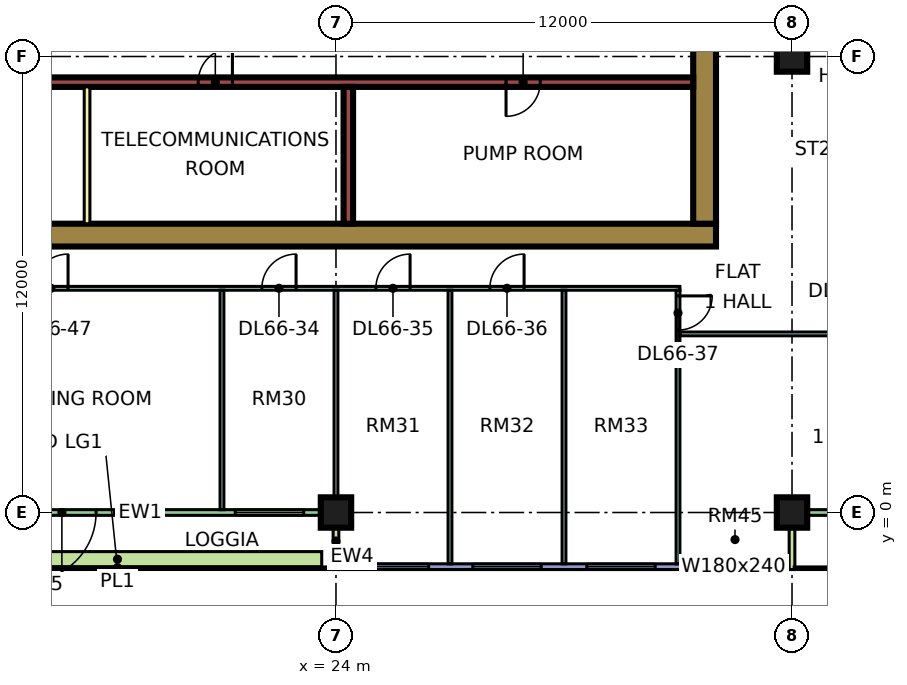
"""IFC4 building model, lengths in metres.
Left out: names, types, materials, properties, quantities, classifications, styles, units other than length and angle.
Written with IfcOpenShell. Run it as: python <this file> out.ifc"""

import sys

from ifc_helpers import new_model, si_unit, direction, frame, frame_2d, origin, origin_2d, place, context, subcontext, project, spatial, rectangle, extrude, element, fill, save


model = new_model("IFC4")
c1 = context("Model", 3, precision=1e-05, world=origin(), true_north=direction((0.0, 1.0)))
c2 = subcontext(c1, "Body", "Model", "MODEL_VIEW")
j1 = project(units=[si_unit("LENGTHUNIT", "METRE"), si_unit("PLANEANGLEUNIT", "RADIAN")], contexts=[c1])
p1 = place(None, origin())
s1 = spatial("IfcSite", under=j1, at=p1, CompositionType="ELEMENT")
p2 = place(p1, origin())
s2 = spatial("IfcBuilding", under=s1, at=p2, CompositionType="ELEMENT")
p3 = place(p2, frame((0.0, 0.0, 284.65)))
s3 = spatial("IfcBuildingStorey", under=s2, at=p3, CompositionType="ELEMENT", Elevation=284.65)
for number, where, z_axis, x_axis in (
    (1, (24.0, 0.0, 0.0), (0.0, 0.0, 1.0), (1.0, 0.0, 0.0)),
    (2, (36.0, 0.0, 0.0), (0.0, 0.0, 1.0), (1.0, 0.0, 0.0)),
    (3, (36.0, 12.0, 0.0), (0.0, 0.0, 1.0), (1.0, 0.0, 0.0)),
):
    element("IfcColumn", number, at=place(p3, frame(where, z_axis=z_axis, x_axis=x_axis)), inside=s3, PredefinedType="COLUMN", context=c2, shape_type="SweptSolid", body=[
        extrude(rectangle(XDim=0.8, YDim=0.8, at=origin_2d()), origin(), (0.0, 0.0, 1.0), 3.75),
    ])
p4 = place(p3, frame((9.0, 7.3, 0.0), z_axis=(0.0, 0.0, 1.0), x_axis=(1.0, 0.0, 0.0)))
e4 = element("IfcWall", 4, at=p4, inside=s3, PredefinedType="SHEAR", context=c2, shape_type="SweptSolid", body=[
    extrude(rectangle(XDim=25.0, YDim=0.6, at=frame_2d((12.5, 0.0))), origin(), (0.0, 0.0, 1.0), 3.75),
])
p5 = place(p3, frame((33.7, 7.6, 0.0), z_axis=(0.0, 0.0, 1.0), x_axis=(0.0, 1.0, 0.0)))
e5 = element("IfcWall", 5, at=p5, inside=s3, PredefinedType="SHEAR", context=c2, shape_type="SweptSolid", body=[
    extrude(rectangle(XDim=11.8, YDim=0.6, at=frame_2d((5.9, 0.0))), origin(), (0.0, 0.0, 1.0), 3.75),
])
p6 = place(p5, frame((5.6, 0.0, 0.0)))
e6 = element("IfcOpeningElement", 6, at=p6, cuts=e5, PredefinedType="OPENING", context=c2, shape_type="SweptSolid", body=[
    extrude(rectangle(XDim=1.8, YDim=2.4, at=frame_2d((0.9, 1.2))), frame((0.0, 0.31, 0.0), z_axis=(0.0, -1.0, 0.0), x_axis=(1.0, 0.0, 0.0)), (0.0, 0.0, 1.0), 0.62),
])
p7 = place(p3, frame((13.45, 11.325, 0.0), z_axis=(0.0, 0.0, 1.0), x_axis=(1.0, 0.0, 0.0)))
e7 = element("IfcWall", 7, at=p7, inside=s3, PredefinedType="SHEAR", context=c2, shape_type="SweptSolid", body=[
    extrude(rectangle(XDim=19.95, YDim=0.25, at=frame_2d((9.975, 0.0))), origin(), (0.0, 0.0, 1.0), 3.75),
])
p8 = place(p7, frame((1.55, 0.0, 0.0)))
e8 = element("IfcOpeningElement", 8, at=p8, cuts=e7, PredefinedType="OPENING", context=c2, shape_type="SweptSolid", body=[
    extrude(rectangle(XDim=0.9, YDim=2.1, at=frame_2d((0.45, 1.05))), frame((0.0, 0.135, 0.0), z_axis=(0.0, -1.0, 0.0), x_axis=(1.0, 0.0, 0.0)), (0.0, 0.0, 1.0), 0.27),
])
p9 = place(p7, frame((6.925, 0.0, 0.0)))
e9 = element("IfcOpeningElement", 9, at=p9, cuts=e7, PredefinedType="OPENING", context=c2, shape_type="SweptSolid", body=[
    extrude(rectangle(XDim=0.9, YDim=2.1, at=frame_2d((0.45, 1.05))), frame((0.0, 0.135, 0.0), z_axis=(0.0, -1.0, 0.0), x_axis=(1.0, 0.0, 0.0)), (0.0, 0.0, 1.0), 0.27),
])
p10 = place(p7, frame((15.025, 0.0, 0.0)))
e10 = element("IfcOpeningElement", 10, at=p10, cuts=e7, PredefinedType="OPENING", context=c2, shape_type="SweptSolid", body=[
    extrude(rectangle(XDim=0.9, YDim=2.1, at=frame_2d((0.45, 1.05))), frame((0.0, 0.135, 0.0), z_axis=(0.0, -1.0, 0.0), x_axis=(1.0, 0.0, 0.0)), (0.0, 0.0, 1.0), 0.27),
])
p11 = place(p3, frame((24.325, 7.6, 0.0), z_axis=(0.0, 0.0, 1.0), x_axis=(0.0, 1.0, 0.0)))
e11 = element("IfcWall", 11, at=p11, inside=s3, PredefinedType="SHEAR", context=c2, shape_type="SweptSolid", body=[
    extrude(rectangle(XDim=3.6, YDim=0.25, at=frame_2d((1.8, 0.0))), origin(), (0.0, 0.0, 1.0), 3.75),
])
p12 = place(p3, frame((12.575, 0.0, 0.0), z_axis=(0.0, 0.0, 1.0), x_axis=(1.0, 0.0, 0.0)))
e12 = element("IfcWall", 12, at=p12, inside=s3, PredefinedType="SOLIDWALL", context=c2, shape_type="SweptSolid", body=[
    extrude(rectangle(XDim=11.35, YDim=0.15, at=frame_2d((5.675, 0.0))), origin(), (0.0, 0.0, 1.0), 3.35),
])
p13 = place(p12, frame((3.312, 0.0, 0.0)))
e13 = element("IfcOpeningElement", 13, at=p13, cuts=e12, PredefinedType="OPENING", context=c2, shape_type="SweptSolid", body=[
    extrude(rectangle(XDim=1.8, YDim=2.4, at=frame_2d((0.9, 1.2))), frame((0.0, 0.085, 0.0), z_axis=(0.0, -1.0, 0.0), x_axis=(1.0, 0.0, 0.0)), (0.0, 0.0, 1.0), 0.17),
])
p14 = place(p12, frame((8.775, 0.0, 0.45)))
e14 = element("IfcOpeningElement", 14, at=p14, cuts=e12, PredefinedType="OPENING", context=c2, shape_type="SweptSolid", body=[
    extrude(rectangle(XDim=1.8, YDim=2.4, at=frame_2d((0.9, 1.2))), frame((0.0, 0.085, 0.0), z_axis=(0.0, -1.0, 0.0), x_axis=(1.0, 0.0, 0.0)), (0.0, 0.0, 1.0), 0.17),
])
p15 = place(p3, frame((24.0, -1.5, 0.0), z_axis=(0.0, 0.0, 1.0), x_axis=(0.0, 1.0, 0.0)))
e15 = element("IfcWall", 15, at=p15, inside=s3, PredefinedType="SOLIDWALL", context=c2, shape_type="SweptSolid", body=[
    extrude(rectangle(XDim=1.5, YDim=0.15, at=frame_2d((0.75, 0.0))), origin(), (0.0, 0.0, 1.0), 3.35),
])
p16 = place(p3, frame((24.075, -1.425, 0.0), z_axis=(0.0, 0.0, 1.0), x_axis=(1.0, 0.0, 0.0)))
e16 = element("IfcWall", 16, at=p16, inside=s3, PredefinedType="SOLIDWALL", context=c2, shape_type="SweptSolid", body=[
    extrude(rectangle(XDim=11.85, YDim=0.15, at=frame_2d((5.925, 0.0))), origin(), (0.0, 0.0, 1.0), 3.35),
])
p17 = place(p16, frame((0.562, 0.0, 0.45)))
e17 = element("IfcOpeningElement", 17, at=p17, cuts=e16, PredefinedType="OPENING", context=c2, shape_type="SweptSolid", body=[
    extrude(rectangle(XDim=1.8, YDim=2.4, at=frame_2d((0.9, 1.2))), frame((0.0, 0.085, 0.0), z_axis=(0.0, -1.0, 0.0), x_axis=(1.0, 0.0, 0.0)), (0.0, 0.0, 1.0), 0.17),
])
p18 = place(p16, frame((3.525, 0.0, 0.45)))
e18 = element("IfcOpeningElement", 18, at=p18, cuts=e16, PredefinedType="OPENING", context=c2, shape_type="SweptSolid", body=[
    extrude(rectangle(XDim=1.8, YDim=2.4, at=frame_2d((0.9, 1.2))), frame((0.0, 0.085, 0.0), z_axis=(0.0, -1.0, 0.0), x_axis=(1.0, 0.0, 0.0)), (0.0, 0.0, 1.0), 0.17),
])
p19 = place(p16, frame((6.525, 0.0, 0.45)))
e19 = element("IfcOpeningElement", 19, at=p19, cuts=e16, PredefinedType="OPENING", context=c2, shape_type="SweptSolid", body=[
    extrude(rectangle(XDim=1.8, YDim=2.4, at=frame_2d((0.9, 1.2))), frame((0.0, 0.085, 0.0), z_axis=(0.0, -1.0, 0.0), x_axis=(1.0, 0.0, 0.0)), (0.0, 0.0, 1.0), 0.17),
])
p20 = place(p16, frame((9.488, 0.0, 0.45)))
e20 = element("IfcOpeningElement", 20, at=p20, cuts=e16, PredefinedType="OPENING", context=c2, shape_type="SweptSolid", body=[
    extrude(rectangle(XDim=1.8, YDim=2.4, at=frame_2d((0.9, 1.2))), frame((0.0, 0.085, 0.0), z_axis=(0.0, -1.0, 0.0), x_axis=(1.0, 0.0, 0.0)), (0.0, 0.0, 1.0), 0.17),
])
p21 = place(p3, frame((36.075, 0.0, 0.0), z_axis=(0.0, 0.0, 1.0), x_axis=(1.0, 0.0, 0.0)))
e21 = element("IfcWall", 21, at=p21, inside=s3, PredefinedType="SOLIDWALL", context=c2, shape_type="SweptSolid", body=[
    extrude(rectangle(XDim=11.85, YDim=0.15, at=frame_2d((5.925, 0.0))), origin(), (0.0, 0.0, 1.0), 3.35),
])
p22 = place(p21, frame((2.275, 0.0, 0.0)))
e22 = element("IfcOpeningElement", 22, at=p22, cuts=e21, PredefinedType="OPENING", context=c2, shape_type="SweptSolid", body=[
    extrude(rectangle(XDim=1.8, YDim=2.4, at=frame_2d((0.9, 1.2))), frame((0.0, 0.085, 0.0), z_axis=(0.0, -1.0, 0.0), x_axis=(1.0, 0.0, 0.0)), (0.0, 0.0, 1.0), 0.17),
])
p23 = place(p21, frame((6.275, 0.0, 0.45)))
e23 = element("IfcOpeningElement", 23, at=p23, cuts=e21, PredefinedType="OPENING", context=c2, shape_type="SweptSolid", body=[
    extrude(rectangle(XDim=1.8, YDim=2.4, at=frame_2d((0.9, 1.2))), frame((0.0, 0.085, 0.0), z_axis=(0.0, -1.0, 0.0), x_axis=(1.0, 0.0, 0.0)), (0.0, 0.0, 1.0), 0.17),
])
p24 = place(p21, frame((10.038, 0.0, 0.45)))
e24 = element("IfcOpeningElement", 24, at=p24, cuts=e21, PredefinedType="OPENING", context=c2, shape_type="SweptSolid", body=[
    extrude(rectangle(XDim=1.2, YDim=2.4, at=frame_2d((0.6, 1.2))), frame((0.0, 0.085, 0.0), z_axis=(0.0, -1.0, 0.0), x_axis=(1.0, 0.0, 0.0)), (0.0, 0.0, 1.0), 0.17),
])
p25 = place(p3, frame((36.0, -1.5, 0.0), z_axis=(0.0, 0.0, 1.0), x_axis=(0.0, 1.0, 0.0)))
e25 = element("IfcWall", 25, at=p25, inside=s3, PredefinedType="SOLIDWALL", context=c2, shape_type="SweptSolid", body=[
    extrude(rectangle(XDim=1.5, YDim=0.15, at=frame_2d((0.75, 0.0))), origin(), (0.0, 0.0, 1.0), 3.35),
])
p26 = place(p3, frame((12.875, -1.229, 0.0), z_axis=(0.0, 0.0, 1.0), x_axis=(1.0, 0.0, 0.0)))
e26 = element("IfcWall", 26, at=p26, inside=s3, PredefinedType="SOLIDWALL", context=c2, shape_type="SweptSolid", body=[
    extrude(rectangle(XDim=10.75, YDim=0.4, at=frame_2d((5.375, 0.0))), origin(), (0.0, 0.0, 1.0), 0.7),
])
p27 = place(p3, frame((17.45, 7.6, 0.0), z_axis=(0.0, 0.0, 1.0), x_axis=(0.0, 1.0, 0.0)))
e27 = element("IfcWall", 27, at=p27, inside=s3, PredefinedType="PARTITIONING", context=c2, shape_type="SweptSolid", body=[
    extrude(rectangle(XDim=3.6, YDim=0.15, at=frame_2d((1.8, 0.0))), origin(), (0.0, 0.0, 1.0), 3.35),
])
p28 = place(p3, frame((11.95, 5.9, 0.0), z_axis=(0.0, 0.0, 1.0), x_axis=(1.0, 0.0, 0.0)))
e28 = element("IfcWall", 28, at=p28, inside=s3, PredefinedType="PARTITIONING", context=c2, shape_type="SweptSolid", body=[
    extrude(rectangle(XDim=21.1, YDim=0.1, at=frame_2d((10.55, 0.0))), origin(), (0.0, 0.0, 1.0), 3.35),
])
p29 = place(p28, frame((10.1, 0.0, 0.0)))
e29 = element("IfcOpeningElement", 29, at=p29, cuts=e28, PredefinedType="OPENING", context=c2, shape_type="SweptSolid", body=[
    extrude(rectangle(XDim=0.9, YDim=2.1, at=frame_2d((0.45, 1.05))), frame((0.0, 0.06, 0.0), z_axis=(0.0, -1.0, 0.0), x_axis=(1.0, 0.0, 0.0)), (0.0, 0.0, 1.0), 0.12),
])
p30 = place(p28, frame((13.1, 0.0, 0.0)))
e30 = element("IfcOpeningElement", 30, at=p30, cuts=e28, PredefinedType="OPENING", context=c2, shape_type="SweptSolid", body=[
    extrude(rectangle(XDim=0.9, YDim=2.1, at=frame_2d((0.45, 1.05))), frame((0.0, 0.06, 0.0), z_axis=(0.0, -1.0, 0.0), x_axis=(1.0, 0.0, 0.0)), (0.0, 0.0, 1.0), 0.12),
])
p31 = place(p28, frame((16.1, 0.0, 0.0)))
e31 = element("IfcOpeningElement", 31, at=p31, cuts=e28, PredefinedType="OPENING", context=c2, shape_type="SweptSolid", body=[
    extrude(rectangle(XDim=0.9, YDim=2.1, at=frame_2d((0.45, 1.05))), frame((0.0, 0.06, 0.0), z_axis=(0.0, -1.0, 0.0), x_axis=(1.0, 0.0, 0.0)), (0.0, 0.0, 1.0), 0.12),
])
p32 = place(p28, frame((4.1, 0.0, 0.0)))
e32 = element("IfcOpeningElement", 32, at=p32, cuts=e28, PredefinedType="OPENING", context=c2, shape_type="SweptSolid", body=[
    extrude(rectangle(XDim=0.9, YDim=2.1, at=frame_2d((0.45, 1.05))), frame((0.0, 0.06, 0.0), z_axis=(0.0, -1.0, 0.0), x_axis=(1.0, 0.0, 0.0)), (0.0, 0.0, 1.0), 0.12),
])
p33 = place(p3, frame((21.0, 0.074, 0.0), z_axis=(0.0, 0.0, 1.0), x_axis=(0.0, 1.0, 0.0)))
e33 = element("IfcWall", 33, at=p33, inside=s3, PredefinedType="PARTITIONING", context=c2, shape_type="SweptSolid", body=[
    extrude(rectangle(XDim=5.776, YDim=0.1, at=frame_2d((2.888, 0.0))), origin(), (0.0, 0.0, 1.0), 3.35),
])
p34 = place(p3, frame((24.0, 0.0, 0.0), z_axis=(0.0, 0.0, 1.0), x_axis=(0.0, 1.0, 0.0)))
e34 = element("IfcWall", 34, at=p34, inside=s3, PredefinedType="PARTITIONING", context=c2, shape_type="SweptSolid", body=[
    extrude(rectangle(XDim=5.85, YDim=0.1, at=frame_2d((2.925, 0.0))), origin(), (0.0, 0.0, 1.0), 3.35),
])
for number, where, z_axis, x_axis in (
    (35, (27.0, -1.351, 0.0), (0.0, 0.0, 1.0), (0.0, 1.0, 0.0)),
    (36, (30.0, -1.351, 0.0), (0.0, 0.0, 1.0), (0.0, 1.0, 0.0)),
):
    element("IfcWall", number, at=place(p3, frame(where, z_axis=z_axis, x_axis=x_axis)), inside=s3, PredefinedType="PARTITIONING", context=c2, shape_type="SweptSolid", body=[
        extrude(rectangle(XDim=7.201, YDim=0.1, at=frame_2d((3.601, 0.0))), origin(), (0.0, 0.0, 1.0), 3.35),
    ])
p35 = place(p3, frame((33.0, -1.35, 0.0), z_axis=(0.0, 0.0, 1.0), x_axis=(0.0, 1.0, 0.0)))
e37 = element("IfcWall", 37, at=p35, inside=s3, PredefinedType="PARTITIONING", context=c2, shape_type="SweptSolid", body=[
    extrude(rectangle(XDim=7.2, YDim=0.1, at=frame_2d((3.6, 0.0))), origin(), (0.0, 0.0, 1.0), 3.35),
])
p36 = place(p35, frame((6.15, 0.0, 0.0)))
e38 = element("IfcOpeningElement", 38, at=p36, cuts=e37, PredefinedType="OPENING", context=c2, shape_type="SweptSolid", body=[
    extrude(rectangle(XDim=0.9, YDim=2.1, at=frame_2d((0.45, 1.05))), frame((0.0, 0.06, 0.0), z_axis=(0.0, -1.0, 0.0), x_axis=(1.0, 0.0, 0.0)), (0.0, 0.0, 1.0), 0.12),
])
p37 = place(p3, frame((33.05, 4.7, 0.0), z_axis=(0.0, 0.0, 1.0), x_axis=(1.0, 0.0, 0.0)))
e39 = element("IfcWall", 39, at=p37, inside=s3, PredefinedType="PARTITIONING", context=c2, shape_type="SweptSolid", body=[
    extrude(rectangle(XDim=20.85, YDim=0.1, at=frame_2d((10.425, 0.0))), origin(), (0.0, 0.0, 1.0), 3.35),
])
p38 = place(p37, frame((10.0, 0.0, 0.0)))
e40 = element("IfcOpeningElement", 40, at=p38, cuts=e39, PredefinedType="OPENING", context=c2, shape_type="SweptSolid", body=[
    extrude(rectangle(XDim=0.9, YDim=2.1, at=frame_2d((0.45, 1.05))), frame((0.0, 0.06, 0.0), z_axis=(0.0, -1.0, 0.0), x_axis=(1.0, 0.0, 0.0)), (0.0, 0.0, 1.0), 0.12),
])
p39 = place(p37, frame((13.0, 0.0, 0.0)))
e41 = element("IfcOpeningElement", 41, at=p39, cuts=e39, PredefinedType="OPENING", context=c2, shape_type="SweptSolid", body=[
    extrude(rectangle(XDim=0.9, YDim=2.1, at=frame_2d((0.45, 1.05))), frame((0.0, 0.06, 0.0), z_axis=(0.0, -1.0, 0.0), x_axis=(1.0, 0.0, 0.0)), (0.0, 0.0, 1.0), 0.12),
])
p40 = place(p37, frame((16.0, 0.0, 0.0)))
e42 = element("IfcOpeningElement", 42, at=p40, cuts=e39, PredefinedType="OPENING", context=c2, shape_type="SweptSolid", body=[
    extrude(rectangle(XDim=0.9, YDim=2.1, at=frame_2d((0.45, 1.05))), frame((0.0, 0.06, 0.0), z_axis=(0.0, -1.0, 0.0), x_axis=(1.0, 0.0, 0.0)), (0.0, 0.0, 1.0), 0.12),
])
p41 = place(p37, frame((19.0, 0.0, 0.0)))
e43 = element("IfcOpeningElement", 43, at=p41, cuts=e39, PredefinedType="OPENING", context=c2, shape_type="SweptSolid", body=[
    extrude(rectangle(XDim=0.9, YDim=2.1, at=frame_2d((0.45, 1.05))), frame((0.0, 0.06, 0.0), z_axis=(0.0, -1.0, 0.0), x_axis=(1.0, 0.0, 0.0)), (0.0, 0.0, 1.0), 0.12),
])
p42 = place(p37, frame((4.0, 0.0, 0.0)))
e44 = element("IfcOpeningElement", 44, at=p42, cuts=e39, PredefinedType="OPENING", context=c2, shape_type="SweptSolid", body=[
    extrude(rectangle(XDim=0.9, YDim=2.1, at=frame_2d((0.45, 1.05))), frame((0.0, 0.06, 0.0), z_axis=(0.0, -1.0, 0.0), x_axis=(1.0, 0.0, 0.0)), (0.0, 0.0, 1.0), 0.12),
])
p43 = place(p13, frame((1.8, 0.0, 0.0), z_axis=(0.0, 0.0, 1.0), x_axis=(-1.0, 0.0, 0.0)))
e45 = element("IfcDoor", 45, at=p43, inside=s3, OperationType="DOUBLE_DOOR_SINGLE_SWING", PredefinedType="DOOR", context=c2, shape_type="SweptSolid", body=[
    extrude(rectangle(XDim=1.8, YDim=2.4, at=frame_2d((0.9, 1.2))), frame((0.0, 0.025, 0.0), z_axis=(0.0, -1.0, 0.0), x_axis=(1.0, 0.0, 0.0)), (0.0, 0.0, 1.0), 0.05),
])
fill(e13, e45)
p44 = place(p14, origin())
e46 = element("IfcWindow", 46, at=p44, inside=s3, PartitioningType="SINGLE_PANEL", PredefinedType="WINDOW", context=c2, shape_type="SweptSolid", body=[
    extrude(rectangle(XDim=1.8, YDim=2.4, at=frame_2d((0.9, 1.2))), frame((0.0, 0.03, 0.0), z_axis=(0.0, -1.0, 0.0), x_axis=(1.0, 0.0, 0.0)), (0.0, 0.0, 1.0), 0.06),
])
fill(e14, e46)
p45 = place(p17, origin())
e47 = element("IfcWindow", 47, at=p45, inside=s3, PartitioningType="SINGLE_PANEL", PredefinedType="WINDOW", context=c2, shape_type="SweptSolid", body=[
    extrude(rectangle(XDim=1.8, YDim=2.4, at=frame_2d((0.9, 1.2))), frame((0.0, 0.03, 0.0), z_axis=(0.0, -1.0, 0.0), x_axis=(1.0, 0.0, 0.0)), (0.0, 0.0, 1.0), 0.06),
])
fill(e17, e47)
p46 = place(p18, origin())
e48 = element("IfcWindow", 48, at=p46, inside=s3, PartitioningType="SINGLE_PANEL", PredefinedType="WINDOW", context=c2, shape_type="SweptSolid", body=[
    extrude(rectangle(XDim=1.8, YDim=2.4, at=frame_2d((0.9, 1.2))), frame((0.0, 0.03, 0.0), z_axis=(0.0, -1.0, 0.0), x_axis=(1.0, 0.0, 0.0)), (0.0, 0.0, 1.0), 0.06),
])
fill(e18, e48)
p47 = place(p19, origin())
e49 = element("IfcWindow", 49, at=p47, inside=s3, PartitioningType="SINGLE_PANEL", PredefinedType="WINDOW", context=c2, shape_type="SweptSolid", body=[
    extrude(rectangle(XDim=1.8, YDim=2.4, at=frame_2d((0.9, 1.2))), frame((0.0, 0.03, 0.0), z_axis=(0.0, -1.0, 0.0), x_axis=(1.0, 0.0, 0.0)), (0.0, 0.0, 1.0), 0.06),
])
fill(e19, e49)
p48 = place(p20, origin())
e50 = element("IfcWindow", 50, at=p48, inside=s3, PartitioningType="SINGLE_PANEL", PredefinedType="WINDOW", context=c2, shape_type="SweptSolid", body=[
    extrude(rectangle(XDim=1.8, YDim=2.4, at=frame_2d((0.9, 1.2))), frame((0.0, 0.03, 0.0), z_axis=(0.0, -1.0, 0.0), x_axis=(1.0, 0.0, 0.0)), (0.0, 0.0, 1.0), 0.06),
])
fill(e20, e50)
p49 = place(p9, frame((0.9, 0.0, 0.0), z_axis=(0.0, 0.0, 1.0), x_axis=(-1.0, 0.0, 0.0)))
e51 = element("IfcDoor", 51, at=p49, inside=s3, OperationType="SINGLE_SWING_RIGHT", PredefinedType="DOOR", context=c2, shape_type="SweptSolid", body=[
    extrude(rectangle(XDim=0.9, YDim=2.1, at=frame_2d((0.45, 1.05))), frame((0.0, 0.025, 0.0), z_axis=(0.0, -1.0, 0.0), x_axis=(1.0, 0.0, 0.0)), (0.0, 0.0, 1.0), 0.05),
])
fill(e9, e51)
p50 = place(p10, frame((0.9, 0.0, 0.0), z_axis=(0.0, 0.0, 1.0), x_axis=(-1.0, 0.0, 0.0)))
e52 = element("IfcDoor", 52, at=p50, inside=s3, OperationType="SINGLE_SWING_LEFT", PredefinedType="DOOR", context=c2, shape_type="SweptSolid", body=[
    extrude(rectangle(XDim=0.9, YDim=2.1, at=frame_2d((0.45, 1.05))), frame((0.0, 0.025, 0.0), z_axis=(0.0, -1.0, 0.0), x_axis=(1.0, 0.0, 0.0)), (0.0, 0.0, 1.0), 0.05),
])
fill(e10, e52)
p51 = place(p29, frame((0.9, 0.0, 0.0), z_axis=(0.0, 0.0, 1.0), x_axis=(-1.0, 0.0, 0.0)))
e53 = element("IfcDoor", 53, at=p51, inside=s3, OperationType="SINGLE_SWING_RIGHT", PredefinedType="DOOR", context=c2, shape_type="SweptSolid", body=[
    extrude(rectangle(XDim=0.9, YDim=2.1, at=frame_2d((0.45, 1.05))), frame((0.0, 0.025, 0.0), z_axis=(0.0, -1.0, 0.0), x_axis=(1.0, 0.0, 0.0)), (0.0, 0.0, 1.0), 0.05),
])
fill(e29, e53)
p52 = place(p30, frame((0.9, 0.0, 0.0), z_axis=(0.0, 0.0, 1.0), x_axis=(-1.0, 0.0, 0.0)))
e54 = element("IfcDoor", 54, at=p52, inside=s3, OperationType="SINGLE_SWING_RIGHT", PredefinedType="DOOR", context=c2, shape_type="SweptSolid", body=[
    extrude(rectangle(XDim=0.9, YDim=2.1, at=frame_2d((0.45, 1.05))), frame((0.0, 0.025, 0.0), z_axis=(0.0, -1.0, 0.0), x_axis=(1.0, 0.0, 0.0)), (0.0, 0.0, 1.0), 0.05),
])
fill(e30, e54)
p53 = place(p31, frame((0.9, 0.0, 0.0), z_axis=(0.0, 0.0, 1.0), x_axis=(-1.0, 0.0, 0.0)))
e55 = element("IfcDoor", 55, at=p53, inside=s3, OperationType="SINGLE_SWING_RIGHT", PredefinedType="DOOR", context=c2, shape_type="SweptSolid", body=[
    extrude(rectangle(XDim=0.9, YDim=2.1, at=frame_2d((0.45, 1.05))), frame((0.0, 0.025, 0.0), z_axis=(0.0, -1.0, 0.0), x_axis=(1.0, 0.0, 0.0)), (0.0, 0.0, 1.0), 0.05),
])
fill(e31, e55)
p54 = place(p36, origin())
e56 = element("IfcDoor", 56, at=p54, inside=s3, OperationType="SINGLE_SWING_RIGHT", PredefinedType="DOOR", context=c2, shape_type="SweptSolid", body=[
    extrude(rectangle(XDim=0.9, YDim=2.1, at=frame_2d((0.45, 1.05))), frame((0.0, 0.025, 0.0), z_axis=(0.0, -1.0, 0.0), x_axis=(1.0, 0.0, 0.0)), (0.0, 0.0, 1.0), 0.05),
])
fill(e38, e56)
p55 = place(p32, frame((0.9, 0.0, 0.0), z_axis=(0.0, 0.0, 1.0), x_axis=(-1.0, 0.0, 0.0)))
e57 = element("IfcDoor", 57, at=p55, inside=s3, OperationType="SINGLE_SWING_RIGHT", PredefinedType="DOOR", context=c2, shape_type="SweptSolid", body=[
    extrude(rectangle(XDim=0.9, YDim=2.1, at=frame_2d((0.45, 1.05))), frame((0.0, 0.025, 0.0), z_axis=(0.0, -1.0, 0.0), x_axis=(1.0, 0.0, 0.0)), (0.0, 0.0, 1.0), 0.05),
])
fill(e32, e57)
save(model, sys.argv[1])
